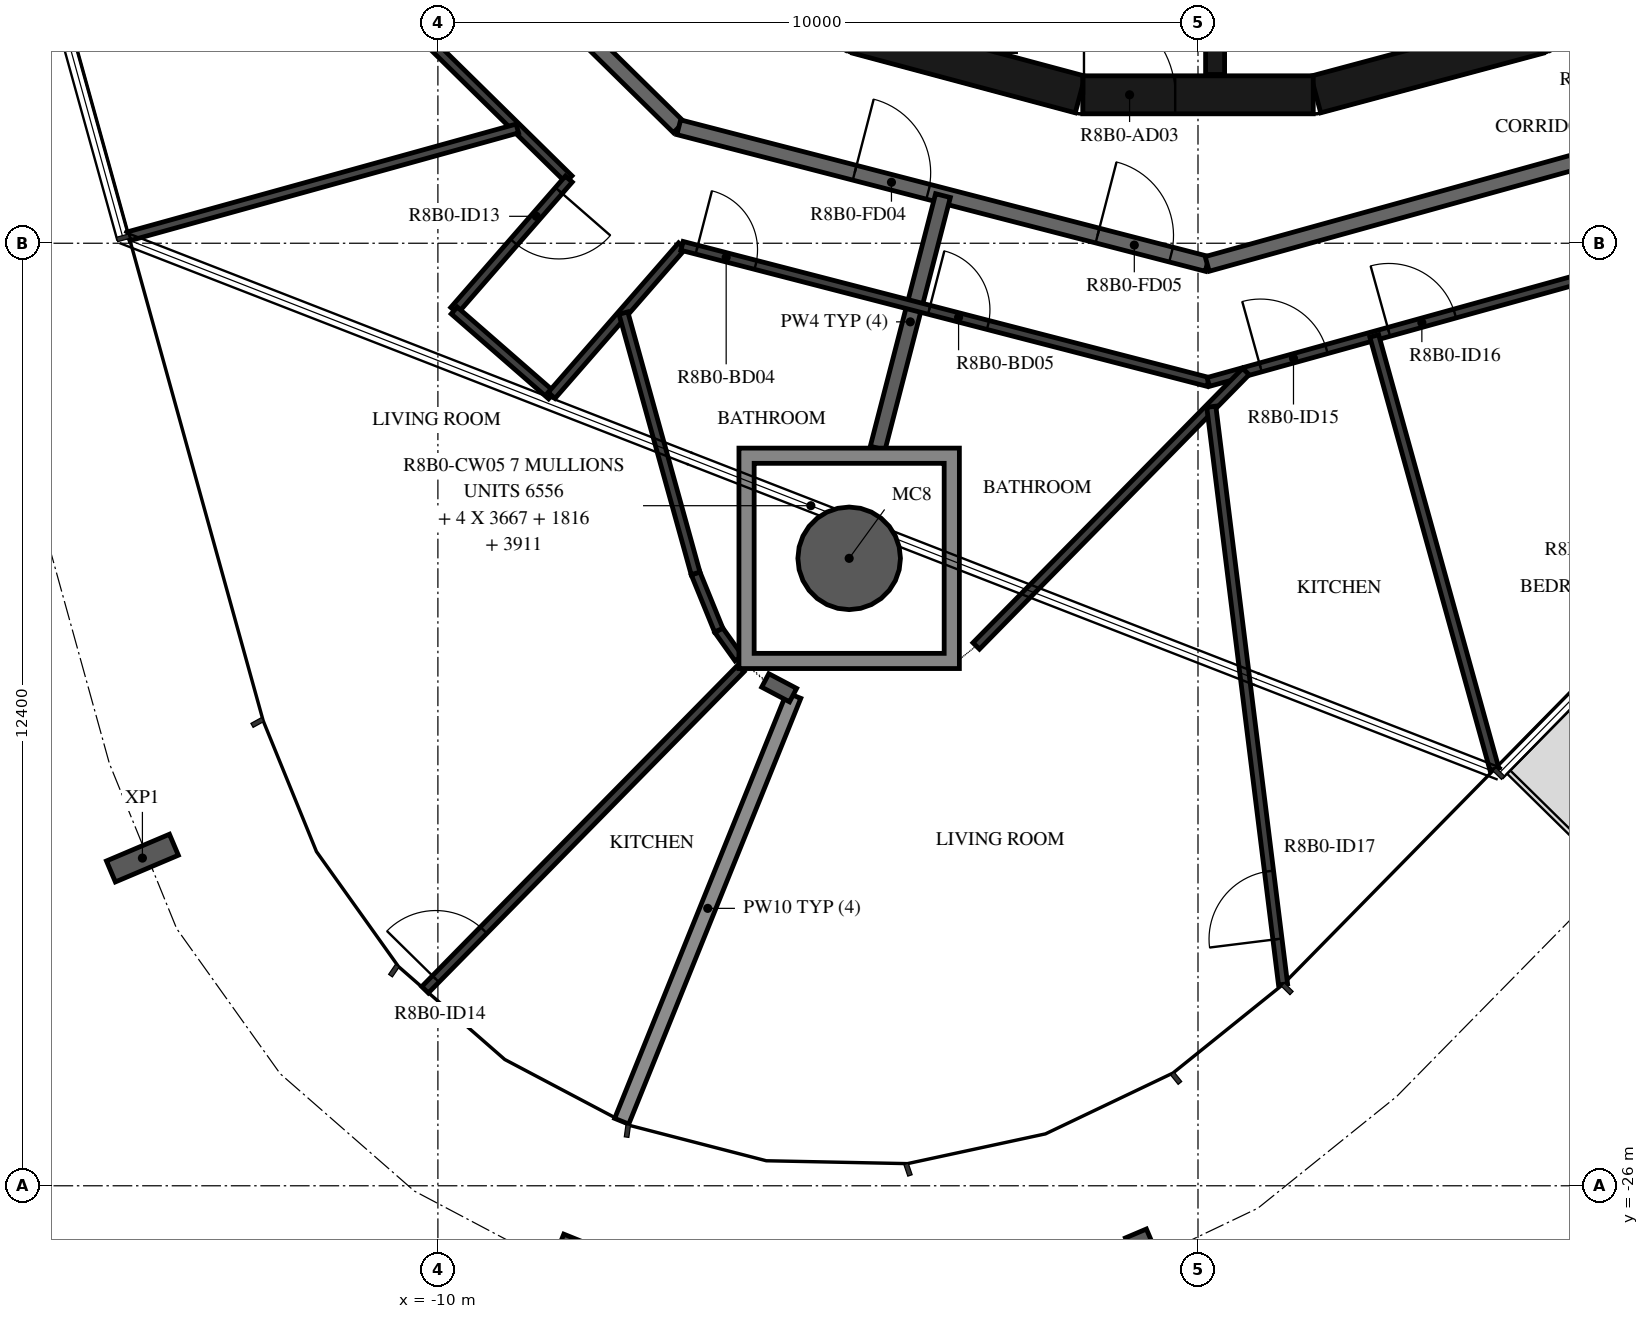
"""IFC4 building model, lengths in metres.
Left out: names, types, materials, properties, quantities, classifications, styles, units other than length and angle.
Written with IfcOpenShell. Run it as: python <this file> out.ifc"""

import sys

from ifc_helpers import new_model, si_unit, direction, frame, frame_2d, origin, origin_2d, place, context, subcontext, project, spatial, polyline, rectangle, hollow_circle, i_section, outline, extrude, element, fill, save


model = new_model("IFC4")
c1 = context("Model", 3, precision=1e-05, world=origin(), true_north=direction((0.0, 1.0)))
c2 = subcontext(c1, "Body", "Model", "MODEL_VIEW")
j1 = project(units=[si_unit("LENGTHUNIT", "METRE"), si_unit("PLANEANGLEUNIT", "RADIAN")], contexts=[c1])
p1 = place(None, origin())
s1 = spatial("IfcSite", under=j1, at=p1, CompositionType="ELEMENT")
p2 = place(p1, origin())
s2 = spatial("IfcBuilding", under=s1, at=p2, CompositionType="ELEMENT")
p3 = place(p2, frame((0.0, 0.0, 312.2)))
s3 = spatial("IfcBuildingStorey", under=s2, at=p3, CompositionType="ELEMENT", Elevation=312.2)
p4 = place(p3, frame((-4.589, -17.745, -0.38), z_axis=(0.0, 0.0, 1.0), x_axis=(1.0, 0.0, 0.0)))
e1 = element("IfcColumn", 1, at=p4, inside=s3, PredefinedType="COLUMN", context=c2, shape_type="SweptSolid", body=[
    extrude(hollow_circle(Radius=0.675, WallThickness=0.03, at=origin_2d()), origin(), (0.0, 0.0, 1.0), 3.5),
])
for number, where, z_axis, x_axis in (
    (2, (-13.887, -21.689, -0.38), (0.0, 0.0, 1.0), (-0.39, 0.921, 0.0)),
    (3, (-8.373, -27.11, -0.38), (0.0, 0.0, 1.0), (-0.927, 0.375, 0.0)),
    (4, (-0.641, -27.042, -0.38), (0.0, 0.0, 1.0), (-0.92, -0.391, 0.0)),
):
    element("IfcColumn", number, at=place(p3, frame(where, z_axis=z_axis, x_axis=x_axis)), inside=s3, PredefinedType="COLUMN", context=c2, shape_type="SweptSolid", body=[
        extrude(i_section(OverallWidth=0.3, OverallDepth=0.9, WebThickness=0.019, FlangeThickness=0.035, FilletRadius=0.03, at=origin_2d()), origin(), (0.0, 0.0, 1.0), 3.5),
    ])
for number, where, z_axis, x_axis in (
    (5, (1.55, -11.643, 0.0), (0.0, 0.0, 1.0), (0.966, 0.259, 0.0)),
    (6, (-4.479, -10.858, 0.0), (0.0, 0.0, 1.0), (0.966, -0.259, 0.0)),
):
    element("IfcWall", number, at=place(p3, frame(where, z_axis=z_axis, x_axis=x_axis)), inside=s3, PredefinedType="SHEAR", context=c2, shape_type="SweptSolid", body=[
        extrude(rectangle(XDim=3.033, YDim=0.5, at=frame_2d((1.516, 0.0))), origin(), (0.0, 0.0, 1.0), 3.12),
    ])
p5 = place(p3, frame((-1.516, -11.647, 0.0), z_axis=(0.0, 0.0, 1.0), x_axis=(1.0, 0.0, 0.0)))
e7 = element("IfcWall", 7, at=p5, inside=s3, PredefinedType="SHEAR", context=c2, shape_type="SweptSolid", body=[
    extrude(rectangle(XDim=3.033, YDim=0.5, at=frame_2d((1.516, 0.0))), origin(), (0.0, 0.0, 1.0), 3.12),
])
p6 = place(p5, frame((0.016, 0.0, 0.0)))
e8 = element("IfcOpeningElement", 8, at=p6, cuts=e7, PredefinedType="OPENING", context=c2, shape_type="SweptSolid", body=[
    extrude(rectangle(XDim=1.2, YDim=2.1, at=frame_2d((0.6, 1.05))), frame((0.0, 0.26, 0.0), z_axis=(0.0, -1.0, 0.0), x_axis=(1.0, 0.0, 0.0)), (0.0, 0.0, 1.0), 0.52),
])
p7 = place(p3, frame((0.225, -8.97, 0.0), z_axis=(0.0, 0.0, 1.0), x_axis=(0.0, -1.0, 0.0)))
e9 = element("IfcWall", 9, at=p7, inside=s3, PredefinedType="SHEAR", context=c2, shape_type="SweptSolid", body=[
    extrude(rectangle(XDim=2.41, YDim=0.25, at=frame_2d((1.205, 0.0))), origin(), (0.0, 0.0, 1.0), 3.12),
])
p8 = place(p3, frame((-11.953, -7.041, 0.0), z_axis=(0.0, 0.0, 1.0), x_axis=(0.713250549143, -0.70090916255, 0.0)))
e10 = element("IfcWall", 10, at=p8, inside=s3, PredefinedType="STANDARD", context=c2, shape_type="SweptSolid", body=[
    extrude(rectangle(XDim=7.181, YDim=0.2, at=frame_2d((3.59, 0.0))), origin(), (0.0, 0.0, 1.0), 3.12),
])
p9 = place(p3, frame((-6.831, -12.074, 0.0), z_axis=(0.0, 0.0, 1.0), x_axis=(0.968144780225, -0.250391063186, 0.0)))
e11 = element("IfcWall", 11, at=p9, inside=s3, PredefinedType="STANDARD", context=c2, shape_type="SweptSolid", body=[
    extrude(rectangle(XDim=7.181, YDim=0.2, at=frame_2d((3.591, 0.0))), origin(), (0.0, 0.0, 1.0), 3.12),
])
p10 = place(p9, frame((2.39, 0.0, 0.0)))
e12 = element("IfcOpeningElement", 12, at=p10, cuts=e11, PredefinedType="OPENING", context=c2, shape_type="SweptSolid", body=[
    extrude(rectangle(XDim=1.0, YDim=2.1, at=frame_2d((0.5, 1.05))), frame((0.0, 0.11, 0.0), z_axis=(0.0, -1.0, 0.0), x_axis=(1.0, 0.0, 0.0)), (0.0, 0.0, 1.0), 0.22),
])
p11 = place(p9, frame((5.69, 0.0, 0.0)))
e13 = element("IfcOpeningElement", 13, at=p11, cuts=e11, PredefinedType="OPENING", context=c2, shape_type="SweptSolid", body=[
    extrude(rectangle(XDim=1.0, YDim=2.1, at=frame_2d((0.5, 1.05))), frame((0.0, 0.11, 0.0), z_axis=(0.0, -1.0, 0.0), x_axis=(1.0, 0.0, 0.0)), (0.0, 0.0, 1.0), 0.22),
])
p12 = place(p3, frame((0.121, -13.872, 0.0), z_axis=(0.0, 0.0, 1.0), x_axis=(0.963625960674, 0.267254575108, 0.0)))
e14 = element("IfcWall", 14, at=p12, inside=s3, PredefinedType="STANDARD", context=c2, shape_type="SweptSolid", body=[
    extrude(rectangle(XDim=7.181, YDim=0.2, at=frame_2d((3.591, 0.0))), origin(), (0.0, 0.0, 1.0), 3.12),
])
p13 = place(p3, frame((-4.214, -16.295, 0.0), z_axis=(0.0, 0.0, 1.0), x_axis=(0.250428810918, 0.968135016752, 0.0)))
e15 = element("IfcWall", 15, at=p13, inside=s3, PredefinedType="STANDARD", context=c2, shape_type="SweptSolid", body=[
    extrude(rectangle(XDim=3.432, YDim=0.2, at=frame_2d((1.716, 0.0))), origin(), (0.0, 0.0, 1.0), 3.12),
])
p14 = place(p3, frame((-7.582, -25.151, 0.0), z_axis=(0.0, 0.0, 1.0), x_axis=(0.3746561435, 0.927163833493, 0.0)))
e16 = element("IfcWall", 16, at=p14, inside=s3, PredefinedType="STANDARD", context=c2, shape_type="SweptSolid", body=[
    extrude(rectangle(XDim=6.041, YDim=0.2, at=frame_2d((3.021, 0.0))), origin(), (0.0, 0.0, 1.0), 2.73),
])
p15 = place(p3, frame((-5.327, -19.545, 0.0), z_axis=(0.0, 0.0, 1.0), x_axis=(-0.884418577045, 0.466694525979, 0.0)))
e17 = element("IfcWall", 17, at=p15, inside=s3, PredefinedType="STANDARD", context=c2, shape_type="SweptSolid", body=[
    extrude(rectangle(XDim=0.414, YDim=0.2, at=frame_2d((0.207, 0.0))), origin(), (0.0, 0.0, 1.0), 3.12),
])
p16 = place(p3, frame((-13.291, -7.829, 0.0), z_axis=(0.0, 0.0, 1.0), x_axis=(0.71326209988, -0.700897408238, 0.0)))
e18 = element("IfcWall", 18, at=p16, inside=s3, PredefinedType="PARTITIONING", context=c2, shape_type="SweptSolid", body=[
    extrude(rectangle(XDim=7.029, YDim=0.12, at=frame_2d((3.515, 0.0))), origin(), (0.0, 0.0, 1.0), 3.12),
])
p17 = place(p3, frame((-8.278, -12.756, 0.0), z_axis=(0.0, 0.0, 1.0), x_axis=(-0.657358463875, -0.753578031774, 0.0)))
e19 = element("IfcWall", 19, at=p17, inside=s3, PredefinedType="PARTITIONING", context=c2, shape_type="SweptSolid", body=[
    extrude(rectangle(XDim=2.294, YDim=0.12, at=frame_2d((1.147, 0.0))), origin(), (0.0, 0.0, 1.0), 3.12),
])
p18 = place(p17, frame((0.2, 0.0, 0.0)))
e20 = element("IfcOpeningElement", 20, at=p18, cuts=e19, PredefinedType="OPENING", context=c2, shape_type="SweptSolid", body=[
    extrude(rectangle(XDim=0.9, YDim=2.1, at=frame_2d((0.45, 1.05))), frame((0.0, 0.07, 0.0), z_axis=(0.0, -1.0, 0.0), x_axis=(1.0, 0.0, 0.0)), (0.0, 0.0, 1.0), 0.14),
])
p19 = place(p3, frame((-9.785, -14.484, 0.0), z_axis=(0.0, 0.0, 1.0), x_axis=(0.753643217927, -0.657283728745, 0.0)))
e21 = element("IfcWall", 21, at=p19, inside=s3, PredefinedType="PARTITIONING", context=c2, shape_type="SweptSolid", body=[
    extrude(rectangle(XDim=1.7, YDim=0.12, at=frame_2d((0.85, 0.0))), origin(), (0.0, 0.0, 1.0), 3.12),
])
p20 = place(p3, frame((-8.504, -15.602, 0.0), z_axis=(0.0, 0.0, 1.0), x_axis=(0.657298689015, 0.753630170189, 0.0)))
e22 = element("IfcWall", 22, at=p20, inside=s3, PredefinedType="PARTITIONING", context=c2, shape_type="SweptSolid", body=[
    extrude(rectangle(XDim=2.61, YDim=0.12, at=frame_2d((1.305, 0.0))), origin(), (0.0, 0.0, 1.0), 3.12),
])
p21 = place(p3, frame((-6.788, -13.635, 0.0), z_axis=(0.0, 0.0, 1.0), x_axis=(0.968142345176, -0.250400478189, 0.0)))
e23 = element("IfcWall", 23, at=p21, inside=s3, PredefinedType="PARTITIONING", context=c2, shape_type="SweptSolid", body=[
    extrude(rectangle(XDim=7.151, YDim=0.12, at=frame_2d((3.575, 0.0))), origin(), (0.0, 0.0, 1.0), 3.12),
])
p22 = place(p21, frame((0.2, 0.0, 0.0)))
e24 = element("IfcOpeningElement", 24, at=p22, cuts=e23, PredefinedType="OPENING", context=c2, shape_type="SweptSolid", body=[
    extrude(rectangle(XDim=0.8, YDim=2.1, at=frame_2d((0.4, 1.05))), frame((0.0, 0.07, 0.0), z_axis=(0.0, -1.0, 0.0), x_axis=(1.0, 0.0, 0.0)), (0.0, 0.0, 1.0), 0.14),
])
p23 = place(p21, frame((3.358, 0.0, 0.0)))
e25 = element("IfcOpeningElement", 25, at=p23, cuts=e23, PredefinedType="OPENING", context=c2, shape_type="SweptSolid", body=[
    extrude(rectangle(XDim=0.8, YDim=2.1, at=frame_2d((0.4, 1.05))), frame((0.0, 0.07, 0.0), z_axis=(0.0, -1.0, 0.0), x_axis=(1.0, 0.0, 0.0)), (0.0, 0.0, 1.0), 0.14),
])
p24 = place(p3, frame((-14.066, -13.508, 0.0), z_axis=(0.0, 0.0, 1.0), x_axis=(0.963634530082, 0.267223674913, 0.0)))
e26 = element("IfcWall", 26, at=p24, inside=s3, PredefinedType="PARTITIONING", context=c2, shape_type="SweptSolid", body=[
    extrude(rectangle(XDim=5.304, YDim=0.12, at=frame_2d((2.652, 0.0))), origin(), (0.0, 0.0, 1.0), 2.73),
])
p25 = place(p3, frame((-6.042, -19.061, 0.0), z_axis=(0.0, 0.0, 1.0), x_axis=(-0.580679627377, 0.814132157791, 0.0)))
e27 = element("IfcWall", 27, at=p25, inside=s3, PredefinedType="PARTITIONING", context=c2, shape_type="SweptSolid", body=[
    extrude(rectangle(XDim=0.455, YDim=0.12, at=frame_2d((0.228, 0.0))), origin(), (0.0, 0.0, 1.0), 3.12),
])
p26 = place(p3, frame((-6.306, -18.69, 0.0), z_axis=(0.0, 0.0, 1.0), x_axis=(-0.377123826076, 0.926162847347, 0.0)))
e28 = element("IfcWall", 28, at=p26, inside=s3, PredefinedType="PARTITIONING", context=c2, shape_type="SweptSolid", body=[
    extrude(rectangle(XDim=0.807, YDim=0.12, at=frame_2d((0.403, 0.0))), origin(), (0.0, 0.0, 1.0), 3.12),
])
p27 = place(p3, frame((-6.61, -17.943, 0.0), z_axis=(0.0, 0.0, 1.0), x_axis=(-0.267254066434, 0.96362610175, 0.0)))
e29 = element("IfcWall", 29, at=p27, inside=s3, PredefinedType="PARTITIONING", context=c2, shape_type="SweptSolid", body=[
    extrude(rectangle(XDim=3.553, YDim=0.12, at=frame_2d((1.777, 0.0))), origin(), (0.0, 0.0, 1.0), 3.12),
])
p28 = place(p3, frame((-10.169, -23.421, 0.0), z_axis=(0.0, 0.0, 1.0), x_axis=(0.70104569517, 0.713116353258, 0.0)))
e30 = element("IfcWall", 30, at=p28, inside=s3, PredefinedType="PARTITIONING", context=c2, shape_type="SweptSolid", body=[
    extrude(rectangle(XDim=5.926, YDim=0.12, at=frame_2d((2.963, 0.0))), origin(), (0.0, 0.0, 1.0), 3.12),
])
p29 = place(p28, frame((0.2, 0.0, 0.0)))
e31 = element("IfcOpeningElement", 31, at=p29, cuts=e30, PredefinedType="OPENING", context=c2, shape_type="SweptSolid", body=[
    extrude(rectangle(XDim=0.9, YDim=2.1, at=frame_2d((0.45, 1.05))), frame((0.0, 0.07, 0.0), z_axis=(0.0, -1.0, 0.0), x_axis=(1.0, 0.0, 0.0)), (0.0, 0.0, 1.0), 0.14),
])
p30 = place(p3, frame((0.135, -15.425, 0.0), z_axis=(0.0, 0.0, 1.0), x_axis=(0.963633899075, 0.267225950373, 0.0)))
e32 = element("IfcWall", 32, at=p30, inside=s3, PredefinedType="PARTITIONING", context=c2, shape_type="SweptSolid", body=[
    extrude(rectangle(XDim=7.985, YDim=0.12, at=frame_2d((3.992, 0.0))), origin(), (0.0, 0.0, 1.0), 3.12),
])
p31 = place(p30, frame((0.714, 0.0, 0.0)))
e33 = element("IfcOpeningElement", 33, at=p31, cuts=e32, PredefinedType="OPENING", context=c2, shape_type="SweptSolid", body=[
    extrude(rectangle(XDim=0.9, YDim=2.1, at=frame_2d((0.45, 1.05))), frame((0.0, 0.07, 0.0), z_axis=(0.0, -1.0, 0.0), x_axis=(1.0, 0.0, 0.0)), (0.0, 0.0, 1.0), 0.14),
])
p32 = place(p30, frame((2.467, 0.0, 0.0)))
e34 = element("IfcOpeningElement", 34, at=p32, cuts=e32, PredefinedType="OPENING", context=c2, shape_type="SweptSolid", body=[
    extrude(rectangle(XDim=0.9, YDim=2.1, at=frame_2d((0.45, 1.05))), frame((0.0, 0.07, 0.0), z_axis=(0.0, -1.0, 0.0), x_axis=(1.0, 0.0, 0.0)), (0.0, 0.0, 1.0), 0.14),
])
p33 = place(p3, frame((-2.918, -18.898, 0.0), z_axis=(0.0, 0.0, 1.0), x_axis=(0.700881606707, 0.713277627141, 0.0)))
e35 = element("IfcWall", 35, at=p33, inside=s3, PredefinedType="PARTITIONING", context=c2, shape_type="SweptSolid", body=[
    extrude(rectangle(XDim=5.062, YDim=0.12, at=frame_2d((2.531, 0.0))), origin(), (0.0, 0.0, 1.0), 3.12),
])
p34 = place(p3, frame((1.119, -23.35, 0.0), z_axis=(0.0, 0.0, 1.0), x_axis=(-0.123281341476, 0.992371760402, 0.0)))
e36 = element("IfcWall", 36, at=p34, inside=s3, PredefinedType="PARTITIONING", context=c2, shape_type="SweptSolid", body=[
    extrude(rectangle(XDim=7.658, YDim=0.12, at=frame_2d((3.829, 0.0))), origin(), (0.0, 0.0, 1.0), 3.12),
])
p35 = place(p34, frame((0.6, 0.0, 0.0)))
e37 = element("IfcOpeningElement", 37, at=p35, cuts=e36, PredefinedType="OPENING", context=c2, shape_type="SweptSolid", body=[
    extrude(rectangle(XDim=0.9, YDim=2.1, at=frame_2d((0.45, 1.05))), frame((0.0, 0.07, 0.0), z_axis=(0.0, -1.0, 0.0), x_axis=(1.0, 0.0, 0.0)), (0.0, 0.0, 1.0), 0.14),
])
p36 = place(p3, frame((3.9, -20.521, 0.0), z_axis=(0.0, 0.0, 1.0), x_axis=(-0.267235205115, 0.963631332589, 0.0)))
e38 = element("IfcWall", 38, at=p36, inside=s3, PredefinedType="PARTITIONING", context=c2, shape_type="SweptSolid", body=[
    extrude(rectangle(XDim=5.916, YDim=0.12, at=frame_2d((2.958, 0.0))), origin(), (0.0, 0.0, 1.0), 3.12),
])
p37 = place(p3, origin())
e39 = element("IfcWall", 39, at=p37, inside=s3, PredefinedType="STANDARD", context=c2, shape_type="SweptSolid", body=[
    extrude(outline(polyline([(-3.139, -16.295), (-3.139, -19.195), (-6.039, -19.195), (-6.039, -16.295), (-3.139, -16.295)]), holes=[polyline([(-5.839, -18.995), (-3.339, -18.995), (-3.339, -16.495), (-5.839, -16.495), (-5.839, -18.995)])]), origin(), (0.0, 0.0, 1.0), 3.12),
])
p38 = place(p6, origin())
e40 = element("IfcDoor", 40, at=p38, inside=s3, OperationType="SINGLE_SWING_RIGHT", PredefinedType="DOOR", context=c2, shape_type="SweptSolid", body=[
    extrude(rectangle(XDim=1.2, YDim=2.1, at=frame_2d((0.6, 1.05))), frame((0.0, 0.025, 0.0), z_axis=(0.0, -1.0, 0.0), x_axis=(1.0, 0.0, 0.0)), (0.0, 0.0, 1.0), 0.05),
])
fill(e8, e40)
p39 = place(p10, origin())
e41 = element("IfcDoor", 41, at=p39, inside=s3, OperationType="SINGLE_SWING_RIGHT", PredefinedType="DOOR", context=c2, shape_type="SweptSolid", body=[
    extrude(rectangle(XDim=1.0, YDim=2.1, at=frame_2d((0.5, 1.05))), frame((0.0, 0.025, 0.0), z_axis=(0.0, -1.0, 0.0), x_axis=(1.0, 0.0, 0.0)), (0.0, 0.0, 1.0), 0.05),
])
fill(e12, e41)
p40 = place(p18, origin())
e42 = element("IfcDoor", 42, at=p40, inside=s3, OperationType="SINGLE_SWING_RIGHT", PredefinedType="DOOR", context=c2, shape_type="SweptSolid", body=[
    extrude(rectangle(XDim=0.9, YDim=2.1, at=frame_2d((0.45, 1.05))), frame((0.0, 0.025, 0.0), z_axis=(0.0, -1.0, 0.0), x_axis=(1.0, 0.0, 0.0)), (0.0, 0.0, 1.0), 0.05),
])
fill(e20, e42)
p41 = place(p22, origin())
e43 = element("IfcDoor", 43, at=p41, inside=s3, OperationType="SINGLE_SWING_RIGHT", PredefinedType="DOOR", context=c2, shape_type="SweptSolid", body=[
    extrude(rectangle(XDim=0.8, YDim=2.1, at=frame_2d((0.4, 1.05))), frame((0.0, 0.025, 0.0), z_axis=(0.0, -1.0, 0.0), x_axis=(1.0, 0.0, 0.0)), (0.0, 0.0, 1.0), 0.05),
])
fill(e24, e43)
p42 = place(p29, origin())
e44 = element("IfcDoor", 44, at=p42, inside=s3, OperationType="SINGLE_SWING_RIGHT", PredefinedType="DOOR", context=c2, shape_type="SweptSolid", body=[
    extrude(rectangle(XDim=0.9, YDim=2.1, at=frame_2d((0.45, 1.05))), frame((0.0, 0.025, 0.0), z_axis=(0.0, -1.0, 0.0), x_axis=(1.0, 0.0, 0.0)), (0.0, 0.0, 1.0), 0.05),
])
fill(e31, e44)
p43 = place(p11, origin())
e45 = element("IfcDoor", 45, at=p43, inside=s3, OperationType="SINGLE_SWING_LEFT", PredefinedType="DOOR", context=c2, shape_type="SweptSolid", body=[
    extrude(rectangle(XDim=1.0, YDim=2.1, at=frame_2d((0.5, 1.05))), frame((0.0, 0.025, 0.0), z_axis=(0.0, -1.0, 0.0), x_axis=(1.0, 0.0, 0.0)), (0.0, 0.0, 1.0), 0.05),
])
fill(e13, e45)
p44 = place(p23, origin())
e46 = element("IfcDoor", 46, at=p44, inside=s3, OperationType="SINGLE_SWING_RIGHT", PredefinedType="DOOR", context=c2, shape_type="SweptSolid", body=[
    extrude(rectangle(XDim=0.8, YDim=2.1, at=frame_2d((0.4, 1.05))), frame((0.0, 0.025, 0.0), z_axis=(0.0, -1.0, 0.0), x_axis=(1.0, 0.0, 0.0)), (0.0, 0.0, 1.0), 0.05),
])
fill(e25, e46)
p45 = place(p31, origin())
e47 = element("IfcDoor", 47, at=p45, inside=s3, OperationType="SINGLE_SWING_LEFT", PredefinedType="DOOR", context=c2, shape_type="SweptSolid", body=[
    extrude(rectangle(XDim=0.9, YDim=2.1, at=frame_2d((0.45, 1.05))), frame((0.0, 0.025, 0.0), z_axis=(0.0, -1.0, 0.0), x_axis=(1.0, 0.0, 0.0)), (0.0, 0.0, 1.0), 0.05),
])
fill(e33, e47)
p46 = place(p32, origin())
e48 = element("IfcDoor", 48, at=p46, inside=s3, OperationType="SINGLE_SWING_LEFT", PredefinedType="DOOR", context=c2, shape_type="SweptSolid", body=[
    extrude(rectangle(XDim=0.9, YDim=2.1, at=frame_2d((0.45, 1.05))), frame((0.0, 0.025, 0.0), z_axis=(0.0, -1.0, 0.0), x_axis=(1.0, 0.0, 0.0)), (0.0, 0.0, 1.0), 0.05),
])
fill(e34, e48)
p47 = place(p35, origin())
e49 = element("IfcDoor", 49, at=p47, inside=s3, OperationType="SINGLE_SWING_LEFT", PredefinedType="DOOR", context=c2, shape_type="SweptSolid", body=[
    extrude(rectangle(XDim=0.9, YDim=2.1, at=frame_2d((0.45, 1.05))), frame((0.0, 0.025, 0.0), z_axis=(0.0, -1.0, 0.0), x_axis=(1.0, 0.0, 0.0)), (0.0, 0.0, 1.0), 0.05),
])
fill(e37, e49)
save(model, sys.argv[1])
